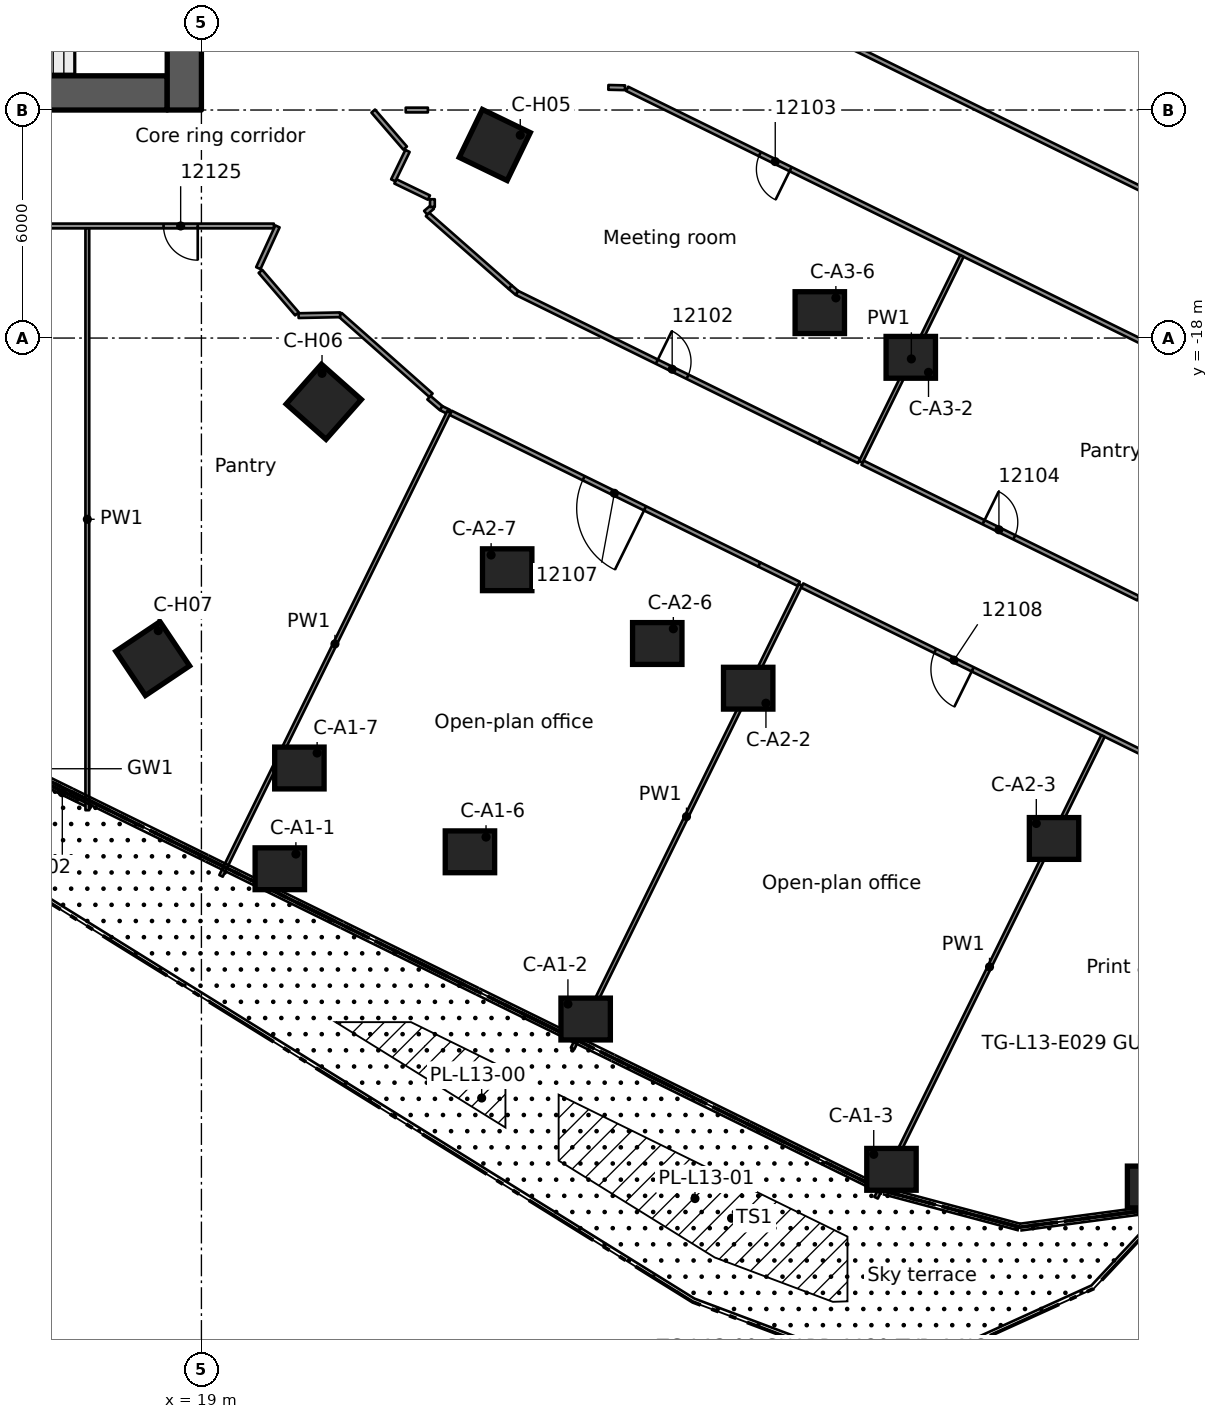
"""IFC4 building model, lengths in metres.
Left out: names, types, materials, properties, quantities, classifications, styles, units other than length and angle.
Written with IfcOpenShell. Run it as: python <this file> out.ifc"""

import sys

from ifc_helpers import new_model, si_unit, direction, frame, frame_2d, origin, origin_2d, place, context, subcontext, project, spatial, rectangle, extrude, element, fill, save


model = new_model("IFC4")
c1 = context("Model", 3, precision=1e-05, world=origin(), true_north=direction((0.0, 1.0)))
c2 = subcontext(c1, "Body", "Model", "MODEL_VIEW")
j1 = project(units=[si_unit("LENGTHUNIT", "METRE"), si_unit("PLANEANGLEUNIT", "RADIAN")], contexts=[c1])
p1 = place(None, origin())
s1 = spatial("IfcSite", under=j1, at=p1, CompositionType="ELEMENT")
p2 = place(p1, origin())
s2 = spatial("IfcBuilding", under=s1, at=p2, CompositionType="ELEMENT")
p3 = place(p2, frame((0.0, 0.0, 58.8)))
s3 = spatial("IfcBuildingStorey", under=s2, at=p3, CompositionType="ELEMENT", Elevation=58.8)
p4 = place(p3, frame((8.9, -11.55, 0.0), z_axis=(0.0, 0.0, 1.0), x_axis=(1.0, 0.0, 0.0)))
e1 = element("IfcWall", 1, at=p4, inside=s3, PredefinedType="SHEAR", context=c2, shape_type="SweptSolid", body=[
    extrude(rectangle(XDim=9.2, YDim=0.9, at=frame_2d((4.6, 0.0))), origin(), (0.0, 0.0, 1.0), 3.5),
])
p5 = place(p4, frame((3.0, 0.0, 0.0)))
e2 = element("IfcOpeningElement", 2, at=p5, cuts=e1, PredefinedType="OPENING", context=c2, shape_type="SweptSolid", body=[
    extrude(rectangle(XDim=1.1, YDim=2.1, at=frame_2d((0.55, 1.05))), frame((0.0, 0.46, 0.0), z_axis=(0.0, -1.0, 0.0), x_axis=(1.0, 0.0, 0.0)), (0.0, 0.0, 1.0), 0.92),
])
p6 = place(p3, frame((18.55, -12.0, 0.0), z_axis=(0.0, 0.0, 1.0), x_axis=(0.0, 1.0, 0.0)))
e3 = element("IfcWall", 3, at=p6, inside=s3, PredefinedType="SHEAR", context=c2, shape_type="SweptSolid", body=[
    extrude(rectangle(XDim=24.0, YDim=0.9, at=frame_2d((12.0, 0.0))), origin(), (0.0, 0.0, 1.0), 3.5),
])
p7 = place(p6, frame((12.1, 0.0, 0.0)))
e4 = element("IfcOpeningElement", 4, at=p7, cuts=e3, PredefinedType="OPENING", context=c2, shape_type="SweptSolid", body=[
    extrude(rectangle(XDim=1.8, YDim=2.1, at=frame_2d((0.9, 1.05))), frame((0.0, 0.46, 0.0), z_axis=(0.0, -1.0, 0.0), x_axis=(1.0, 0.0, 0.0)), (0.0, 0.0, 1.0), 0.92),
])
for number, where, z_axis, x_axis in (
    (5, (21.063, -31.964, 0.0), (0.0, 0.0, 1.0), (1.0, 0.0, 0.0)),
    (6, (29.111, -35.918, 0.0), (0.0, 0.0, 1.0), (1.0, 0.0, 0.0)),
    (7, (37.158, -39.873, 0.0), (0.0, 0.0, 1.0), (1.0, 0.0, 0.0)),
    (8, (44.016, -40.338, 0.0), (0.0, 0.0, 1.0), (1.0, 0.0, 0.0)),
    (9, (26.066, -31.518, 0.0), (0.0, 0.0, 1.0), (1.0, 0.0, 0.0)),
    (10, (21.578, -29.313, 0.0), (0.0, 0.0, 1.0), (1.0, 0.0, 0.0)),
    (11, (33.388, -27.213, 0.0), (0.0, 0.0, 1.0), (1.0, 0.0, 0.0)),
    (12, (41.436, -31.167, 0.0), (0.0, 0.0, 1.0), (1.0, 0.0, 0.0)),
    (13, (30.995, -26.037, 0.0), (0.0, 0.0, 1.0), (1.0, 0.0, 0.0)),
    (14, (27.046, -24.096, 0.0), (0.0, 0.0, 1.0), (1.0, 0.0, 0.0)),
    (15, (37.666, -18.507, 0.0), (0.0, 0.0, 1.0), (1.0, 0.0, 0.0)),
    (16, (35.272, -17.331, 0.0), (0.0, 0.0, 1.0), (1.0, 0.0, 0.0)),
):
    element("IfcColumn", number, at=place(p3, frame(where, z_axis=z_axis, x_axis=x_axis)), inside=s3, PredefinedType="COLUMN", context=c2, shape_type="SweptSolid", body=[
        extrude(rectangle(XDim=1.3, YDim=1.1, at=origin_2d()), origin(), (0.0, 0.0, 1.0), 3.5),
    ])
for number, where, z_axis, x_axis in (
    (17, (26.719, -12.92, 0.0), (0.0, 0.0, 1.0), (0.9, -0.435, 0.0)),
    (18, (22.219, -19.677, 0.0), (0.0, 0.0, 1.0), (0.749, -0.663, 0.0)),
    (19, (17.718, -26.434, 0.0), (0.0, 0.0, 1.0), (0.557, -0.831, 0.0)),
):
    element("IfcColumn", number, at=place(p3, frame(where, z_axis=z_axis, x_axis=x_axis)), inside=s3, PredefinedType="COLUMN", context=c2, shape_type="SweptSolid", body=[
        extrude(rectangle(XDim=1.4, YDim=1.4, at=origin_2d()), origin(), (0.0, 0.0, 1.0), 3.5),
    ])
p8 = place(p3, frame((16.094, -30.336, 0.0), z_axis=(0.0, 0.0, 1.0), x_axis=(-0.897538680415, 0.440935729056, 0.0)))
e20 = element("IfcWall", 20, at=p8, inside=s3, PredefinedType="STANDARD", context=c2, shape_type="SweptSolid", body=[
    extrude(rectangle(XDim=4.55, YDim=0.1, at=frame_2d((2.275, 0.0))), origin(), (0.0, 0.0, 1.0), 3.1),
])
p9 = place(p8, frame((1.39, 0.0, 0.0)))
e21 = element("IfcOpeningElement", 21, at=p9, cuts=e20, PredefinedType="OPENING", context=c2, shape_type="SweptSolid", body=[
    extrude(rectangle(XDim=1.8, YDim=2.4, at=frame_2d((0.9, 1.2))), frame((0.0, 0.06, 0.0), z_axis=(0.0, -1.0, 0.0), x_axis=(1.0, 0.0, 0.0)), (0.0, 0.0, 1.0), 0.12),
])
p10 = place(p8, frame((0.39, 0.0, 0.0)))
e22 = element("IfcOpeningElement", 22, at=p10, cuts=e20, PredefinedType="OPENING", context=c2, shape_type="SweptSolid", body=[
    extrude(rectangle(XDim=0.9, YDim=2.4, at=frame_2d((0.45, 1.2))), frame((0.0, 0.06, 0.0), z_axis=(0.0, -1.0, 0.0), x_axis=(1.0, 0.0, 0.0)), (0.0, 0.0, 1.0), 0.12),
])
p11 = place(p8, frame((3.291, 0.0, 0.0)))
e23 = element("IfcOpeningElement", 23, at=p11, cuts=e20, PredefinedType="OPENING", context=c2, shape_type="SweptSolid", body=[
    extrude(rectangle(XDim=0.9, YDim=2.4, at=frame_2d((0.45, 1.2))), frame((0.0, 0.06, 0.0), z_axis=(0.0, -1.0, 0.0), x_axis=(1.0, 0.0, 0.0)), (0.0, 0.0, 1.0), 0.12),
])
p12 = place(p3, frame((20.553, -16.245, 0.0), z_axis=(0.0, 0.0, 1.0), x_axis=(0.65185455754, -0.758344008886, 0.0)))
e24 = element("IfcWall", 24, at=p12, inside=s3, PredefinedType="PARTITIONING", context=c2, shape_type="SweptSolid", body=[
    extrude(rectangle(XDim=1.474, YDim=0.125, at=frame_2d((0.737, 0.0))), origin(), (0.0, 0.0, 1.0), 3.08),
])
p13 = place(p3, frame((23.521, -12.028, 0.0), z_axis=(0.0, 0.0, 1.0), x_axis=(0.653179910437, -0.757202749996, 0.0)))
e25 = element("IfcWall", 25, at=p13, inside=s3, PredefinedType="PARTITIONING", context=c2, shape_type="SweptSolid", body=[
    extrude(rectangle(XDim=1.286, YDim=0.125, at=frame_2d((0.643, 0.0))), origin(), (0.0, 0.0, 1.0), 3.08),
])
p14 = place(p3, frame((24.947, -14.745, 0.0), z_axis=(0.0, 0.0, 1.0), x_axis=(0.751005565427, -0.660295873603, 0.0)))
e26 = element("IfcWall", 26, at=p14, inside=s3, PredefinedType="PARTITIONING", context=c2, shape_type="SweptSolid", body=[
    extrude(rectangle(XDim=2.901, YDim=0.125, at=frame_2d((1.451, 0.0))), origin(), (0.0, 0.0, 1.0), 3.08),
])
p15 = place(p3, frame((22.651, -17.388, 0.0), z_axis=(0.0, 0.0, 1.0), x_axis=(0.748538321382, -0.663091533216, 0.0)))
e27 = element("IfcWall", 27, at=p15, inside=s3, PredefinedType="PARTITIONING", context=c2, shape_type="SweptSolid", body=[
    extrude(rectangle(XDim=3.194, YDim=0.125, at=frame_2d((1.597, 0.0))), origin(), (0.0, 0.0, 1.0), 3.08),
])
p16 = place(p3, frame((27.126, -16.661, 0.0), z_axis=(0.0, 0.0, 1.0), x_axis=(0.758443722334, -0.651738536571, 0.0)))
e28 = element("IfcWall", 28, at=p16, inside=s3, PredefinedType="PARTITIONING", context=c2, shape_type="SweptSolid", body=[
    extrude(rectangle(XDim=0.233, YDim=0.125, at=frame_2d((0.117, 0.0))), origin(), (0.0, 0.0, 1.0), 3.08),
])
p17 = place(p3, frame((24.986, -19.569, 0.0), z_axis=(0.0, 0.0, 1.0), x_axis=(0.759419144431, -0.650601693106, 0.0)))
e29 = element("IfcWall", 29, at=p17, inside=s3, PredefinedType="PARTITIONING", context=c2, shape_type="SweptSolid", body=[
    extrude(rectangle(XDim=0.424, YDim=0.125, at=frame_2d((0.212, 0.0))), origin(), (0.0, 0.0, 1.0), 3.08),
])
p18 = place(p3, frame((33.681, -23.959, 0.0), z_axis=(0.0, 0.0, 1.0), x_axis=(-0.897502075903, 0.44101023089, 0.0)))
e30 = element("IfcWall", 30, at=p18, inside=s3, PredefinedType="PARTITIONING", context=c2, shape_type="SweptSolid", body=[
    extrude(rectangle(XDim=9.052, YDim=0.125, at=frame_2d((4.526, 0.0))), origin(), (0.0, 0.0, 1.0), 3.08),
])
p19 = place(p18, frame((3.35, 0.0, 0.0)))
e31 = element("IfcOpeningElement", 31, at=p19, cuts=e30, PredefinedType="OPENING", context=c2, shape_type="SweptSolid", body=[
    extrude(rectangle(XDim=1.8, YDim=2.1, at=frame_2d((0.9, 1.05))), frame((0.0, 0.073, 0.0), z_axis=(0.0, -1.0, 0.0), x_axis=(1.0, 0.0, 0.0)), (0.0, 0.0, 1.0), 0.145),
])
p20 = place(p3, frame((44.815, -29.429, 0.0), z_axis=(0.0, 0.0, 1.0), x_axis=(-0.8975062817, 0.441001671549, 0.0)))
e32 = element("IfcWall", 32, at=p20, inside=s3, PredefinedType="PARTITIONING", context=c2, shape_type="SweptSolid", body=[
    extrude(rectangle(XDim=11.15, YDim=0.125, at=frame_2d((5.575, 0.0))), origin(), (0.0, 0.0, 1.0), 3.08),
])
p21 = place(p20, frame((6.149, 0.0, 0.0)))
e33 = element("IfcOpeningElement", 33, at=p21, cuts=e32, PredefinedType="OPENING", context=c2, shape_type="SweptSolid", body=[
    extrude(rectangle(XDim=1.1, YDim=2.1, at=frame_2d((0.55, 1.05))), frame((0.0, 0.073, 0.0), z_axis=(0.0, -1.0, 0.0), x_axis=(1.0, 0.0, 0.0)), (0.0, 0.0, 1.0), 0.145),
])
p22 = place(p3, frame((27.304, -16.813, 0.0), z_axis=(0.0, 0.0, 1.0), x_axis=(0.897492436915, -0.441029846701, 0.0)))
e34 = element("IfcWall", 34, at=p22, inside=s3, PredefinedType="PARTITIONING", context=c2, shape_type="SweptSolid", body=[
    extrude(rectangle(XDim=8.875, YDim=0.125, at=frame_2d((4.438, 0.0))), origin(), (0.0, 0.0, 1.0), 3.08),
])
p23 = place(p22, frame((4.1, 0.0, 0.0)))
e35 = element("IfcOpeningElement", 35, at=p23, cuts=e34, PredefinedType="OPENING", context=c2, shape_type="SweptSolid", body=[
    extrude(rectangle(XDim=0.9, YDim=2.1, at=frame_2d((0.45, 1.05))), frame((0.0, 0.073, 0.0), z_axis=(0.0, -1.0, 0.0), x_axis=(1.0, 0.0, 0.0)), (0.0, 0.0, 1.0), 0.145),
])
p24 = place(p3, frame((36.396, -21.28, 0.0), z_axis=(0.0, 0.0, 1.0), x_axis=(0.897479279636, -0.441056620656, 0.0)))
e36 = element("IfcWall", 36, at=p24, inside=s3, PredefinedType="PARTITIONING", context=c2, shape_type="SweptSolid", body=[
    extrude(rectangle(XDim=8.087, YDim=0.125, at=frame_2d((4.043, 0.0))), origin(), (0.0, 0.0, 1.0), 3.08),
])
p25 = place(p24, frame((3.55, 0.0, 0.0)))
e37 = element("IfcOpeningElement", 37, at=p25, cuts=e36, PredefinedType="OPENING", context=c2, shape_type="SweptSolid", body=[
    extrude(rectangle(XDim=0.9, YDim=2.1, at=frame_2d((0.45, 1.05))), frame((0.0, 0.073, 0.0), z_axis=(0.0, -1.0, 0.0), x_axis=(1.0, 0.0, 0.0)), (0.0, 0.0, 1.0), 0.145),
])
p26 = place(p3, frame((49.036, -20.696, 0.0), z_axis=(0.0, 0.0, 1.0), x_axis=(-0.897509654304, 0.440994807715, 0.0)))
e38 = element("IfcWall", 38, at=p26, inside=s3, PredefinedType="PARTITIONING", context=c2, shape_type="SweptSolid", body=[
    extrude(rectangle(XDim=20.985, YDim=0.125, at=frame_2d((10.492, 0.0))), origin(), (0.0, 0.0, 1.0), 3.08),
])
p27 = place(p26, frame((16.192, 0.0, 0.0)))
e39 = element("IfcOpeningElement", 39, at=p27, cuts=e38, PredefinedType="OPENING", context=c2, shape_type="SweptSolid", body=[
    extrude(rectangle(XDim=0.9, YDim=2.1, at=frame_2d((0.45, 1.05))), frame((0.0, 0.073, 0.0), z_axis=(0.0, -1.0, 0.0), x_axis=(1.0, 0.0, 0.0)), (0.0, 0.0, 1.0), 0.145),
])
p28 = place(p3, frame((32.2, -8.411, 0.0), z_axis=(0.0, 0.0, 1.0), x_axis=(0.897530587373, -0.440952202318, 0.0)))
e40 = element("IfcWall", 40, at=p28, inside=s3, PredefinedType="PARTITIONING", context=c2, shape_type="SweptSolid", body=[
    extrude(rectangle(XDim=17.78, YDim=0.125, at=frame_2d((8.89, 0.0))), origin(), (0.0, 0.0, 1.0), 3.08),
])
p29 = place(p28, frame((1.538, 0.0, 0.0)))
e41 = element("IfcOpeningElement", 41, at=p29, cuts=e40, PredefinedType="OPENING", context=c2, shape_type="SweptSolid", body=[
    extrude(rectangle(XDim=0.9, YDim=2.1, at=frame_2d((0.45, 1.05))), frame((0.0, 0.073, 0.0), z_axis=(0.0, -1.0, 0.0), x_axis=(1.0, 0.0, 0.0)), (0.0, 0.0, 1.0), 0.145),
])
p30 = place(p28, frame((13.24, 0.0, 0.0)))
e42 = element("IfcOpeningElement", 42, at=p30, cuts=e40, PredefinedType="OPENING", context=c2, shape_type="SweptSolid", body=[
    extrude(rectangle(XDim=0.9, YDim=2.1, at=frame_2d((0.45, 1.05))), frame((0.0, 0.073, 0.0), z_axis=(0.0, -1.0, 0.0), x_axis=(1.0, 0.0, 0.0)), (0.0, 0.0, 1.0), 0.145),
])
p31 = place(p3, frame((25.308, -19.845, 0.0), z_axis=(0.0, 0.0, 1.0), x_axis=(0.897628948174, -0.440751938624, 0.0)))
e43 = element("IfcWall", 43, at=p31, inside=s3, PredefinedType="PARTITIONING", context=c2, shape_type="SweptSolid", body=[
    extrude(rectangle(XDim=0.227, YDim=0.125, at=frame_2d((0.114, 0.0))), origin(), (0.0, 0.0, 1.0), 3.08),
])
p32 = place(p3, frame((33.681, -23.959, 0.0), z_axis=(0.0, 0.0, 1.0), x_axis=(0.897699526178, -0.440608171394, 0.0)))
e44 = element("IfcWall", 44, at=p32, inside=s3, PredefinedType="PARTITIONING", context=c2, shape_type="SweptSolid", body=[
    extrude(rectangle(XDim=1.155, YDim=0.125, at=frame_2d((0.578, 0.0))), origin(), (0.0, 0.0, 1.0), 3.08),
])
p33 = place(p3, frame((35.269, -20.727, 0.0), z_axis=(0.0, 0.0, 1.0), x_axis=(0.897658489219, -0.440691770667, 0.0)))
e45 = element("IfcWall", 45, at=p33, inside=s3, PredefinedType="PARTITIONING", context=c2, shape_type="SweptSolid", body=[
    extrude(rectangle(XDim=1.155, YDim=0.125, at=frame_2d((0.578, 0.0))), origin(), (0.0, 0.0, 1.0), 3.08),
])
p34 = place(p3, frame((24.104, -13.877, 0.0), z_axis=(0.0, 0.0, 1.0), x_axis=(0.900272548254, -0.435326703593, 0.0)))
e46 = element("IfcWall", 46, at=p34, inside=s3, PredefinedType="PARTITIONING", context=c2, shape_type="SweptSolid", body=[
    extrude(rectangle(XDim=0.981, YDim=0.125, at=frame_2d((0.49, 0.0))), origin(), (0.0, 0.0, 1.0), 3.08),
])
p35 = place(p3, frame((29.709, -11.404, 0.0), z_axis=(0.0, 0.0, 1.0), x_axis=(0.99973778302, -0.022899021846, 0.0)))
e47 = element("IfcWall", 47, at=p35, inside=s3, PredefinedType="PARTITIONING", context=c2, shape_type="SweptSolid", body=[
    extrude(rectangle(XDim=0.437, YDim=0.125, at=frame_2d((0.219, 0.0))), origin(), (0.0, 0.0, 1.0), 3.08),
])
p36 = place(p3, frame((20.906, -15.051, 0.0), z_axis=(0.0, 0.0, 1.0), x_axis=(-1.0, 0.0, 0.0)))
e48 = element("IfcWall", 48, at=p36, inside=s3, PredefinedType="PARTITIONING", context=c2, shape_type="SweptSolid", body=[
    extrude(rectangle(XDim=9.915, YDim=0.125, at=frame_2d((4.958, 0.0))), origin(), (0.0, 0.0, 1.0), 3.08),
])
p37 = place(p36, frame((7.008, 0.0, 0.0)))
e49 = element("IfcOpeningElement", 49, at=p37, cuts=e48, PredefinedType="OPENING", context=c2, shape_type="SweptSolid", body=[
    extrude(rectangle(XDim=0.9, YDim=2.1, at=frame_2d((0.45, 1.05))), frame((0.0, 0.073, 0.0), z_axis=(0.0, -1.0, 0.0), x_axis=(1.0, 0.0, 0.0)), (0.0, 0.0, 1.0), 0.145),
])
p38 = place(p36, frame((2.002, 0.0, 0.0)))
e50 = element("IfcOpeningElement", 50, at=p38, cuts=e48, PredefinedType="OPENING", context=c2, shape_type="SweptSolid", body=[
    extrude(rectangle(XDim=0.9, YDim=2.1, at=frame_2d((0.45, 1.05))), frame((0.0, 0.073, 0.0), z_axis=(0.0, -1.0, 0.0), x_axis=(1.0, 0.0, 0.0)), (0.0, 0.0, 1.0), 0.145),
])
p39 = place(p3, frame((24.376, -12.0, 0.0), z_axis=(0.0, 0.0, 1.0), x_axis=(1.0, 0.0, 0.0)))
e51 = element("IfcWall", 51, at=p39, inside=s3, PredefinedType="PARTITIONING", context=c2, shape_type="SweptSolid", body=[
    extrude(rectangle(XDim=0.583, YDim=0.125, at=frame_2d((0.292, 0.0))), origin(), (0.0, 0.0, 1.0), 3.08),
])
p40 = place(p3, frame((24.9, -14.702, 0.0), z_axis=(0.0, 0.0, 1.0), x_axis=(0.76279062292, 0.646645548648, 0.0)))
e52 = element("IfcWall", 52, at=p40, inside=s3, PredefinedType="PARTITIONING", context=c2, shape_type="SweptSolid", body=[
    extrude(rectangle(XDim=0.233, YDim=0.125, at=frame_2d((0.117, 0.0))), origin(), (0.0, 0.0, 1.0), 3.08),
])
p41 = place(p3, frame((21.556, -17.41, 0.0), z_axis=(0.0, 0.0, 1.0), x_axis=(0.999798720757, 0.020062850584, 0.0)))
e53 = element("IfcWall", 53, at=p41, inside=s3, PredefinedType="PARTITIONING", context=c2, shape_type="SweptSolid", body=[
    extrude(rectangle(XDim=1.095, YDim=0.125, at=frame_2d((0.548, 0.0))), origin(), (0.0, 0.0, 1.0), 3.08),
])
p42 = place(p3, frame((36.754, -40.62, 0.0), z_axis=(0.0, 0.0, 1.0), x_axis=(0.440962253121, 0.897525649395, 0.0)))
e54 = element("IfcWall", 54, at=p42, inside=s3, PredefinedType="PARTITIONING", context=c2, shape_type="SweptSolid", body=[
    extrude(rectangle(XDim=13.536, YDim=0.1, at=frame_2d((6.768, 0.0))), origin(), (0.0, 0.0, 1.0), 3.08),
])
p43 = place(p3, frame((28.766, -36.695, 0.0), z_axis=(0.0, 0.0, 1.0), x_axis=(0.440983805809, 0.897515060049, 0.0)))
e55 = element("IfcWall", 55, at=p43, inside=s3, PredefinedType="PARTITIONING", context=c2, shape_type="SweptSolid", body=[
    extrude(rectangle(XDim=13.599, YDim=0.1, at=frame_2d((6.799, 0.0))), origin(), (0.0, 0.0, 1.0), 3.08),
])
p44 = place(p3, frame((36.351, -21.258, 0.0), z_axis=(0.0, 0.0, 1.0), x_axis=(0.440827848832, 0.897591670914, 0.0)))
e56 = element("IfcWall", 56, at=p44, inside=s3, PredefinedType="PARTITIONING", context=c2, shape_type="SweptSolid", body=[
    extrude(rectangle(XDim=6.036, YDim=0.1, at=frame_2d((3.018, 0.0))), origin(), (0.0, 0.0, 1.0), 3.08),
])
p45 = place(p3, frame((19.516, -32.151, 0.0), z_axis=(0.0, 0.0, 1.0), x_axis=(0.440904640859, 0.897553952512, 0.0)))
e57 = element("IfcWall", 57, at=p45, inside=s3, PredefinedType="PARTITIONING", context=c2, shape_type="SweptSolid", body=[
    extrude(rectangle(XDim=13.599, YDim=0.1, at=frame_2d((6.799, 0.0))), origin(), (0.0, 0.0, 1.0), 3.08),
])
p46 = place(p3, frame((24.048, -13.85, 0.0), z_axis=(0.0, 0.0, 1.0), x_axis=(0.435939229334, 0.899976104309, 0.0)))
e58 = element("IfcWall", 58, at=p46, inside=s3, PredefinedType="PARTITIONING", context=c2, shape_type="SweptSolid", body=[
    extrude(rectangle(XDim=0.86, YDim=0.125, at=frame_2d((0.43, 0.0))), origin(), (0.0, 0.0, 1.0), 3.08),
])
p47 = place(p3, frame((20.497, -16.16, 0.0), z_axis=(0.0, 0.0, 1.0), x_axis=(0.417134821579, 0.908844618527, 0.0)))
e59 = element("IfcWall", 59, at=p47, inside=s3, PredefinedType="PARTITIONING", context=c2, shape_type="SweptSolid", body=[
    extrude(rectangle(XDim=1.208, YDim=0.125, at=frame_2d((0.604, 0.0))), origin(), (0.0, 0.0, 1.0), 3.08),
])
p48 = place(p3, frame((25.078, -14.551, 0.0), z_axis=(0.0, 0.0, 1.0), x_axis=(0.0, 1.0, 0.0)))
e60 = element("IfcWall", 60, at=p48, inside=s3, PredefinedType="PARTITIONING", context=c2, shape_type="SweptSolid", body=[
    extrude(rectangle(XDim=0.204, YDim=0.125, at=frame_2d((0.102, 0.0))), origin(), (0.0, 0.0, 1.0), 3.08),
])
p49 = place(p3, frame((15.998, -30.423, 0.0), z_axis=(0.0, 0.0, 1.0), x_axis=(0.0, 1.0, 0.0)))
e61 = element("IfcWall", 61, at=p49, inside=s3, PredefinedType="PARTITIONING", context=c2, shape_type="SweptSolid", body=[
    extrude(rectangle(XDim=15.309, YDim=0.1, at=frame_2d((7.655, 0.0))), origin(), (0.0, 0.0, 1.0), 3.08),
])
p50 = place(p10, origin())
e62 = element("IfcWindow", 62, at=p50, inside=s3, PartitioningType="SINGLE_PANEL", PredefinedType="WINDOW", context=c2, shape_type="SweptSolid", body=[
    extrude(rectangle(XDim=0.9, YDim=2.4, at=frame_2d((0.45, 1.2))), frame((0.0, 0.03, 0.0), z_axis=(0.0, -1.0, 0.0), x_axis=(1.0, 0.0, 0.0)), (0.0, 0.0, 1.0), 0.06),
])
fill(e22, e62)
p51 = place(p23, origin())
e63 = element("IfcDoor", 63, at=p51, inside=s3, OperationType="SINGLE_SWING_RIGHT", PredefinedType="DOOR", context=c2, shape_type="SweptSolid", body=[
    extrude(rectangle(XDim=0.9, YDim=2.1, at=frame_2d((0.45, 1.05))), frame((0.0, 0.025, 0.0), z_axis=(0.0, -1.0, 0.0), x_axis=(1.0, 0.0, 0.0)), (0.0, 0.0, 1.0), 0.05),
])
fill(e35, e63)
p52 = place(p27, origin())
e64 = element("IfcDoor", 64, at=p52, inside=s3, OperationType="SINGLE_SWING_RIGHT", PredefinedType="DOOR", context=c2, shape_type="SweptSolid", body=[
    extrude(rectangle(XDim=0.9, YDim=2.1, at=frame_2d((0.45, 1.05))), frame((0.0, 0.025, 0.0), z_axis=(0.0, -1.0, 0.0), x_axis=(1.0, 0.0, 0.0)), (0.0, 0.0, 1.0), 0.05),
])
fill(e39, e64)
p53 = place(p25, origin())
e65 = element("IfcDoor", 65, at=p53, inside=s3, OperationType="SINGLE_SWING_LEFT", PredefinedType="DOOR", context=c2, shape_type="SweptSolid", body=[
    extrude(rectangle(XDim=0.9, YDim=2.1, at=frame_2d((0.45, 1.05))), frame((0.0, 0.025, 0.0), z_axis=(0.0, -1.0, 0.0), x_axis=(1.0, 0.0, 0.0)), (0.0, 0.0, 1.0), 0.05),
])
fill(e37, e65)
p54 = place(p19, origin())
e66 = element("IfcDoor", 66, at=p54, inside=s3, OperationType="DOUBLE_DOOR_SINGLE_SWING", PredefinedType="DOOR", context=c2, shape_type="SweptSolid", body=[
    extrude(rectangle(XDim=1.8, YDim=2.1, at=frame_2d((0.9, 1.05))), frame((0.0, 0.025, 0.0), z_axis=(0.0, -1.0, 0.0), x_axis=(1.0, 0.0, 0.0)), (0.0, 0.0, 1.0), 0.05),
])
fill(e31, e66)
p55 = place(p21, origin())
e67 = element("IfcDoor", 67, at=p55, inside=s3, OperationType="SINGLE_SWING_RIGHT", PredefinedType="DOOR", context=c2, shape_type="SweptSolid", body=[
    extrude(rectangle(XDim=1.1, YDim=2.1, at=frame_2d((0.55, 1.05))), frame((0.0, 0.025, 0.0), z_axis=(0.0, -1.0, 0.0), x_axis=(1.0, 0.0, 0.0)), (0.0, 0.0, 1.0), 0.05),
])
fill(e33, e67)
p56 = place(p38, origin())
e68 = element("IfcDoor", 68, at=p56, inside=s3, OperationType="SINGLE_SWING_LEFT", PredefinedType="DOOR", context=c2, shape_type="SweptSolid", body=[
    extrude(rectangle(XDim=0.9, YDim=2.1, at=frame_2d((0.45, 1.05))), frame((0.0, 0.025, 0.0), z_axis=(0.0, -1.0, 0.0), x_axis=(1.0, 0.0, 0.0)), (0.0, 0.0, 1.0), 0.05),
])
fill(e50, e68)
save(model, sys.argv[1])
